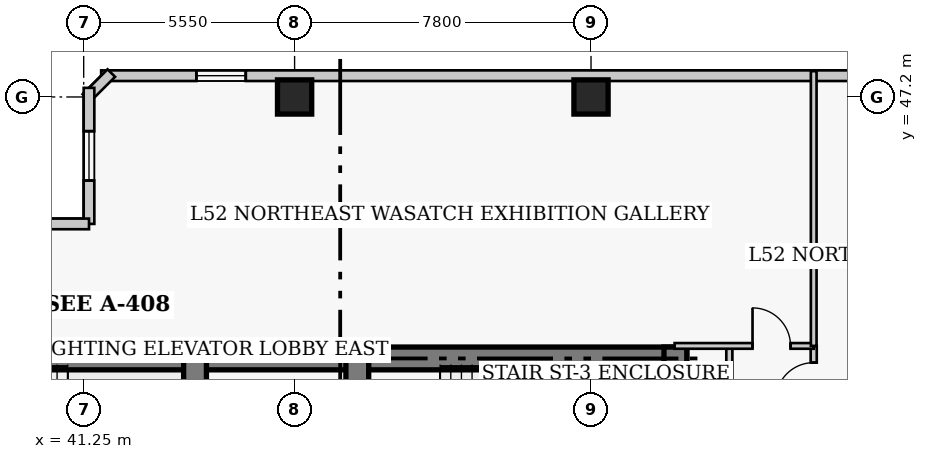
"""IFC4 building model, lengths in metres.
Left out: names, types, materials, properties, quantities, classifications, styles, units other than length and angle.
Written with IfcOpenShell. Run it as: python <this file> out.ifc"""

import sys

from ifc_helpers import new_model, si_unit, direction, frame, frame_2d, origin, origin_2d, place, context, subcontext, project, spatial, rectangle, extrude, element, fill, save


model = new_model("IFC4")
c1 = context("Model", 3, precision=1e-05, world=origin(), true_north=direction((0.0, 1.0)))
c2 = subcontext(c1, "Body", "Model", "MODEL_VIEW")
j1 = project(units=[si_unit("LENGTHUNIT", "METRE"), si_unit("PLANEANGLEUNIT", "RADIAN")], contexts=[c1])
p1 = place(None, origin())
s1 = spatial("IfcSite", under=j1, at=p1, CompositionType="ELEMENT")
p2 = place(p1, origin())
s2 = spatial("IfcBuilding", under=s1, at=p2, CompositionType="ELEMENT")
p3 = place(p2, frame((0.0, 0.0, 208.5)))
s3 = spatial("IfcBuildingStorey", under=s2, at=p3, CompositionType="ELEMENT", Elevation=208.5)
p4 = place(p3, frame((35.85, 40.32, 0.0), z_axis=(0.0, 0.0, 1.0), x_axis=(1.0, 0.0, 0.0)))
e1 = element("IfcWall", 1, at=p4, inside=s3, PredefinedType="SHEAR", context=c2, shape_type="SweptSolid", body=[
    extrude(rectangle(XDim=12.6, YDim=0.6, at=frame_2d((6.3, 0.0))), origin(), (0.0, 0.0, 1.0), 3.9),
])
p5 = place(p3, frame((48.45, 40.32, 0.0), z_axis=(0.0, 0.0, 1.0), x_axis=(1.0, 0.0, 0.0)))
e2 = element("IfcWall", 2, at=p5, inside=s3, PredefinedType="SHEAR", context=c2, shape_type="SweptSolid", body=[
    extrude(rectangle(XDim=8.67, YDim=0.6, at=frame_2d((4.335, 0.0))), origin(), (0.0, 0.0, 1.0), 3.9),
])
p6 = place(p3, frame((56.82, 27.05, 0.0), z_axis=(0.0, 0.0, 1.0), x_axis=(0.0, 1.0, 0.0)))
e3 = element("IfcWall", 3, at=p6, inside=s3, PredefinedType="SHEAR", context=c2, shape_type="SweptSolid", body=[
    extrude(rectangle(XDim=13.57, YDim=0.6, at=frame_2d((6.785, 0.0))), origin(), (0.0, 0.0, 1.0), 3.9),
])
p7 = place(p3, frame((44.18, 36.37, 0.0), z_axis=(0.0, 0.0, 1.0), x_axis=(0.0, 1.0, 0.0)))
e4 = element("IfcWall", 4, at=p7, inside=s3, PredefinedType="SHEAR", context=c2, shape_type="SweptSolid", body=[
    extrude(rectangle(XDim=3.95, YDim=0.6, at=frame_2d((1.975, 0.0))), origin(), (0.0, 0.0, 1.0), 3.9),
])
p8 = place(p3, frame((48.45, 32.45, 0.0), z_axis=(0.0, 0.0, 1.0), x_axis=(0.0, 1.0, 0.0)))
e5 = element("IfcWall", 5, at=p8, inside=s3, PredefinedType="SHEAR", context=c2, shape_type="SweptSolid", body=[
    extrude(rectangle(XDim=7.87, YDim=0.6, at=frame_2d((3.935, 0.0))), origin(), (0.0, 0.0, 1.0), 3.9),
])
p9 = place(p8, frame((5.75, 0.0, 0.0)))
e6 = element("IfcOpeningElement", 6, at=p9, cuts=e5, PredefinedType="OPENING", context=c2, shape_type="SweptSolid", body=[
    extrude(rectangle(XDim=1.1, YDim=2.15, at=frame_2d((0.55, 1.075))), frame((0.0, 0.31, 0.0), z_axis=(0.0, -1.0, 0.0), x_axis=(1.0, 0.0, 0.0)), (0.0, 0.0, 1.0), 0.62),
])
for number, where, z_axis, x_axis in (
    (7, (46.8, 47.2, 0.0), (0.0, 0.0, 1.0), (1.0, 0.0, 0.0)),
    (8, (54.6, 47.2, 0.0), (0.0, 0.0, 1.0), (1.0, 0.0, 0.0)),
):
    element("IfcColumn", number, at=place(p3, frame(where, z_axis=z_axis, x_axis=x_axis)), inside=s3, PredefinedType="COLUMN", context=c2, shape_type="SweptSolid", body=[
        extrude(rectangle(XDim=0.9, YDim=0.9, at=origin_2d()), origin(), (0.0, 0.0, 1.0), 3.9),
    ])
p10 = place(p3, frame((67.54, 47.76, 0.0), z_axis=(0.0, 0.0, 1.0), x_axis=(-1.0, 0.0, 0.0)))
e9 = element("IfcWall", 9, at=p10, inside=s3, PredefinedType="SOLIDWALL", context=c2, shape_type="SweptSolid", body=[
    extrude(rectangle(XDim=25.83, YDim=0.28, at=frame_2d((12.915, 0.0))), origin(), (0.0, 0.0, 1.0), 3.65),
])
p11 = place(p10, frame((3.655, 0.0, 0.85)))
e10 = element("IfcOpeningElement", 10, at=p11, cuts=e9, PredefinedType="OPENING", context=c2, shape_type="SweptSolid", body=[
    extrude(rectangle(XDim=1.3, YDim=1.7, at=frame_2d((0.65, 0.85))), frame((0.0, 0.15, 0.0), z_axis=(0.0, -1.0, 0.0), x_axis=(1.0, 0.0, 0.0)), (0.0, 0.0, 1.0), 0.3),
])
p12 = place(p10, frame((22.025, 0.0, 0.85)))
e11 = element("IfcOpeningElement", 11, at=p12, cuts=e9, PredefinedType="OPENING", context=c2, shape_type="SweptSolid", body=[
    extrude(rectangle(XDim=1.3, YDim=1.7, at=frame_2d((0.65, 0.85))), frame((0.0, 0.15, 0.0), z_axis=(0.0, -1.0, 0.0), x_axis=(1.0, 0.0, 0.0)), (0.0, 0.0, 1.0), 0.3),
])
p13 = place(p3, frame((41.977, 47.829, 0.0), z_axis=(0.0, 0.0, 1.0), x_axis=(-0.706975312048, -0.707238225886, 0.0)))
e12 = element("IfcWall", 12, at=p13, inside=s3, PredefinedType="SOLIDWALL", context=c2, shape_type="SweptSolid", body=[
    extrude(rectangle(XDim=0.929, YDim=0.28, at=frame_2d((0.464, 0.0))), origin(), (0.0, 0.0, 1.0), 3.65),
])
p14 = place(p3, frame((41.39, 47.44, 0.0), z_axis=(0.0, 0.0, 1.0), x_axis=(0.0, -1.0, 0.0)))
e13 = element("IfcWall", 13, at=p14, inside=s3, PredefinedType="SOLIDWALL", context=c2, shape_type="SweptSolid", body=[
    extrude(rectangle(XDim=3.58, YDim=0.28, at=frame_2d((1.79, 0.0))), origin(), (0.0, 0.0, 1.0), 3.65),
])
p15 = place(p14, frame((1.14, 0.0, 0.85)))
e14 = element("IfcOpeningElement", 14, at=p15, cuts=e13, PredefinedType="OPENING", context=c2, shape_type="SweptSolid", body=[
    extrude(rectangle(XDim=1.3, YDim=1.7, at=frame_2d((0.65, 0.85))), frame((0.0, 0.15, 0.0), z_axis=(0.0, -1.0, 0.0), x_axis=(1.0, 0.0, 0.0)), (0.0, 0.0, 1.0), 0.3),
])
p16 = place(p3, frame((41.39, 43.86, 0.0), z_axis=(0.0, 0.0, 1.0), x_axis=(-1.0, 0.0, 0.0)))
e15 = element("IfcWall", 15, at=p16, inside=s3, PredefinedType="SOLIDWALL", context=c2, shape_type="SweptSolid", body=[
    extrude(rectangle(XDim=4.78, YDim=0.28, at=frame_2d((2.39, 0.0))), origin(), (0.0, 0.0, 1.0), 3.65),
])
p17 = place(p16, frame((1.74, 0.0, 0.85)))
e16 = element("IfcOpeningElement", 16, at=p17, cuts=e15, PredefinedType="OPENING", context=c2, shape_type="SweptSolid", body=[
    extrude(rectangle(XDim=1.3, YDim=1.7, at=frame_2d((0.65, 0.85))), frame((0.0, 0.15, 0.0), z_axis=(0.0, -1.0, 0.0), x_axis=(1.0, 0.0, 0.0)), (0.0, 0.0, 1.0), 0.3),
])
p18 = place(p3, frame((60.46, 11.95, 0.0), z_axis=(0.0, 0.0, 1.0), x_axis=(0.0, 1.0, 0.0)))
e17 = element("IfcWall", 17, at=p18, inside=s3, PredefinedType="PARTITIONING", context=c2, shape_type="SweptSolid", body=[
    extrude(rectangle(XDim=28.7, YDim=0.16, at=frame_2d((14.35, 0.0))), origin(), (0.0, 0.0, 1.0), 3.65),
])
p19 = place(p18, frame((0.46, 0.0, 0.0)))
e18 = element("IfcOpeningElement", 18, at=p19, cuts=e17, PredefinedType="OPENING", context=c2, shape_type="SweptSolid", body=[
    extrude(rectangle(XDim=0.95, YDim=2.1, at=frame_2d((0.475, 1.05))), frame((0.0, 0.09, 0.0), z_axis=(0.0, -1.0, 0.0), x_axis=(1.0, 0.0, 0.0)), (0.0, 0.0, 1.0), 0.18),
])
p20 = place(p18, frame((20.1, 0.0, 0.0)))
e19 = element("IfcOpeningElement", 19, at=p20, cuts=e17, PredefinedType="OPENING", context=c2, shape_type="SweptSolid", body=[
    extrude(rectangle(XDim=0.95, YDim=2.1, at=frame_2d((0.475, 1.05))), frame((0.0, 0.09, 0.0), z_axis=(0.0, -1.0, 0.0), x_axis=(1.0, 0.0, 0.0)), (0.0, 0.0, 1.0), 0.18),
])
p21 = place(p18, frame((27.26, 0.0, 0.0)))
e20 = element("IfcOpeningElement", 20, at=p21, cuts=e17, PredefinedType="OPENING", context=c2, shape_type="SweptSolid", body=[
    extrude(rectangle(XDim=1.0, YDim=2.15, at=frame_2d((0.5, 1.075))), frame((0.0, 0.09, 0.0), z_axis=(0.0, -1.0, 0.0), x_axis=(1.0, 0.0, 0.0)), (0.0, 0.0, 1.0), 0.18),
])
p22 = place(p3, frame((58.24, 18.51, 0.0), z_axis=(0.0, 0.0, 1.0), x_axis=(0.0, 1.0, 0.0)))
e21 = element("IfcWall", 21, at=p22, inside=s3, PredefinedType="PARTITIONING", context=c2, shape_type="SweptSolid", body=[
    extrude(rectangle(XDim=22.14, YDim=0.16, at=frame_2d((11.07, 0.0))), origin(), (0.0, 0.0, 1.0), 3.65),
])
p23 = place(p3, frame((56.8, 40.65, 0.0), z_axis=(0.0, 0.0, 1.0), x_axis=(1.0, 0.0, 0.0)))
e22 = element("IfcWall", 22, at=p23, inside=s3, PredefinedType="PARTITIONING", context=c2, shape_type="SweptSolid", body=[
    extrude(rectangle(XDim=3.66, YDim=0.15, at=frame_2d((1.83, 0.0))), origin(), (0.0, 0.0, 1.0), 3.65),
])
p24 = place(p23, frame((2.05, 0.0, 0.0)))
e23 = element("IfcOpeningElement", 23, at=p24, cuts=e22, PredefinedType="OPENING", context=c2, shape_type="SweptSolid", body=[
    extrude(rectangle(XDim=1.0, YDim=2.15, at=frame_2d((0.5, 1.075))), frame((0.0, 0.085, 0.0), z_axis=(0.0, -1.0, 0.0), x_axis=(1.0, 0.0, 0.0)), (0.0, 0.0, 1.0), 0.17),
])
p25 = place(p3, frame((60.46, 40.65, 0.0), z_axis=(0.0, 0.0, 1.0), x_axis=(0.0, 1.0, 0.0)))
e24 = element("IfcWall", 24, at=p25, inside=s3, PredefinedType="PARTITIONING", context=c2, shape_type="SweptSolid", body=[
    extrude(rectangle(XDim=7.23, YDim=0.15, at=frame_2d((3.615, 0.0))), origin(), (0.0, 0.0, 1.0), 3.65),
])
p26 = place(p12, origin())
e25 = element("IfcWindow", 25, at=p26, inside=s3, PartitioningType="SINGLE_PANEL", PredefinedType="WINDOW", context=c2, shape_type="SweptSolid", body=[
    extrude(rectangle(XDim=1.3, YDim=1.7, at=frame_2d((0.65, 0.85))), frame((0.0, 0.03, 0.0), z_axis=(0.0, -1.0, 0.0), x_axis=(1.0, 0.0, 0.0)), (0.0, 0.0, 1.0), 0.06),
])
fill(e11, e25)
p27 = place(p15, origin())
e26 = element("IfcWindow", 26, at=p27, inside=s3, PartitioningType="SINGLE_PANEL", PredefinedType="WINDOW", context=c2, shape_type="SweptSolid", body=[
    extrude(rectangle(XDim=1.3, YDim=1.7, at=frame_2d((0.65, 0.85))), frame((0.0, 0.03, 0.0), z_axis=(0.0, -1.0, 0.0), x_axis=(1.0, 0.0, 0.0)), (0.0, 0.0, 1.0), 0.06),
])
fill(e14, e26)
p28 = place(p24, origin())
e27 = element("IfcDoor", 27, at=p28, inside=s3, OperationType="SINGLE_SWING_LEFT", PredefinedType="DOOR", context=c2, shape_type="SweptSolid", body=[
    extrude(rectangle(XDim=1.0, YDim=2.15, at=frame_2d((0.5, 1.075))), frame((0.0, 0.025, 0.0), z_axis=(0.0, -1.0, 0.0), x_axis=(1.0, 0.0, 0.0)), (0.0, 0.0, 1.0), 0.05),
])
fill(e23, e27)
p29 = place(p21, origin())
e28 = element("IfcDoor", 28, at=p29, inside=s3, OperationType="SINGLE_SWING_LEFT", PredefinedType="DOOR", context=c2, shape_type="SweptSolid", body=[
    extrude(rectangle(XDim=1.0, YDim=2.15, at=frame_2d((0.5, 1.075))), frame((0.0, 0.025, 0.0), z_axis=(0.0, -1.0, 0.0), x_axis=(1.0, 0.0, 0.0)), (0.0, 0.0, 1.0), 0.05),
])
fill(e20, e28)
save(model, sys.argv[1])
